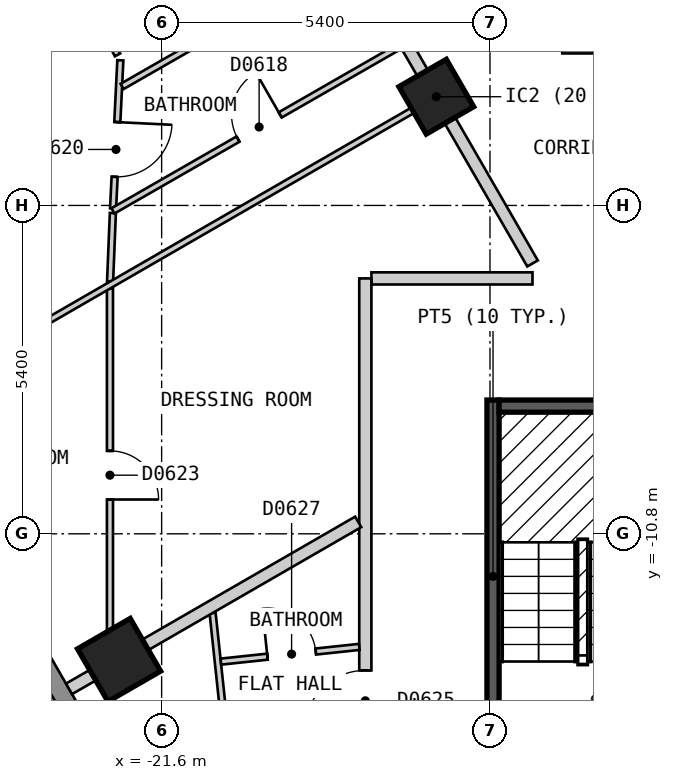
"""IFC4 building model, lengths in metres.
Left out: names, types, materials, properties, quantities, classifications, styles, units other than length and angle.
Written with IfcOpenShell. Run it as: python <this file> out.ifc"""

import sys

from ifc_helpers import new_model, si_unit, direction, frame, frame_2d, origin, origin_2d, place, context, subcontext, project, spatial, polyline, rectangle, outline, extrude, element, fill, save


model = new_model("IFC4")
c1 = context("Model", 3, precision=1e-05, world=origin(), true_north=direction((0.0, 1.0)))
c2 = subcontext(c1, "Body", "Model", "MODEL_VIEW")
j1 = project(units=[si_unit("LENGTHUNIT", "METRE"), si_unit("PLANEANGLEUNIT", "RADIAN")], contexts=[c1])
p1 = place(None, origin())
s1 = spatial("IfcSite", under=j1, at=p1, CompositionType="ELEMENT")
p2 = place(p1, origin())
s2 = spatial("IfcBuilding", under=s1, at=p2, CompositionType="ELEMENT")
p3 = place(p2, frame((0.0, 0.0, 81.0)))
s3 = spatial("IfcBuildingStorey", under=s2, at=p3, CompositionType="ELEMENT", Elevation=81.0)
p4 = place(p3, frame((-22.3, -12.875, 0.0), z_axis=(0.0, 0.0, 1.0), x_axis=(0.5, -0.866025403784, 0.0)))
e1 = element("IfcColumn", 1, at=p4, inside=s3, PredefinedType="COLUMN", context=c2, shape_type="SweptSolid", body=[
    extrude(rectangle(XDim=1.0, YDim=1.0, at=origin_2d()), origin(), (0.0, 0.0, 1.0), 3.0),
])
p5 = place(p3, frame((-17.083, -3.612, 0.0), z_axis=(0.0, 0.0, 1.0), x_axis=(0.5, -0.866025403784, 0.0)))
e2 = element("IfcColumn", 2, at=p5, inside=s3, PredefinedType="COLUMN", context=c2, shape_type="SweptSolid", body=[
    extrude(rectangle(XDim=0.9, YDim=0.9, at=origin_2d()), origin(), (0.0, 0.0, 1.0), 3.0),
])
p6 = place(p3, frame((-29.027, -3.425, 0.0), z_axis=(0.0, 0.0, 1.0), x_axis=(0.500035407905, -0.866004960056, 0.0)))
e3 = element("IfcWall", 3, at=p6, inside=s3, PredefinedType="SOLIDWALL", context=c2, shape_type="SweptSolid", body=[
    extrude(outline(polyline([(0.0, -0.15), (23.094, -0.15), (23.014, 0.15), (0.08, 0.15), (0.0, -0.15)])), origin(), (0.0, 0.0, 1.0), 2.7),
])
p7 = place(p6, frame((1.324, 0.0, 0.15)))
e4 = element("IfcOpeningElement", 4, at=p7, cuts=e3, PredefinedType="OPENING", context=c2, shape_type="SweptSolid", body=[
    extrude(rectangle(XDim=1.5, YDim=2.1, at=frame_2d((0.75, 1.05))), frame((0.0, 0.16, 0.0), z_axis=(0.0, -1.0, 0.0), x_axis=(1.0, 0.0, 0.0)), (0.0, 0.0, 1.0), 0.32),
])
p8 = place(p6, frame((4.031, 0.0, 0.15)))
e5 = element("IfcOpeningElement", 5, at=p8, cuts=e3, PredefinedType="OPENING", context=c2, shape_type="SweptSolid", body=[
    extrude(rectangle(XDim=1.5, YDim=2.1, at=frame_2d((0.75, 1.05))), frame((0.0, 0.16, 0.0), z_axis=(0.0, -1.0, 0.0), x_axis=(1.0, 0.0, 0.0)), (0.0, 0.0, 1.0), 0.32),
])
p9 = place(p6, frame((6.737, 0.0, 0.15)))
e6 = element("IfcOpeningElement", 6, at=p9, cuts=e3, PredefinedType="OPENING", context=c2, shape_type="SweptSolid", body=[
    extrude(rectangle(XDim=1.5, YDim=2.1, at=frame_2d((0.75, 1.05))), frame((0.0, 0.16, 0.0), z_axis=(0.0, -1.0, 0.0), x_axis=(1.0, 0.0, 0.0)), (0.0, 0.0, 1.0), 0.32),
])
p10 = place(p6, frame((9.444, 0.0, 0.15)))
e7 = element("IfcOpeningElement", 7, at=p10, cuts=e3, PredefinedType="OPENING", context=c2, shape_type="SweptSolid", body=[
    extrude(rectangle(XDim=1.5, YDim=2.1, at=frame_2d((0.75, 1.05))), frame((0.0, 0.16, 0.0), z_axis=(0.0, -1.0, 0.0), x_axis=(1.0, 0.0, 0.0)), (0.0, 0.0, 1.0), 0.32),
])
p11 = place(p6, frame((12.151, 0.0, 0.15)))
e8 = element("IfcOpeningElement", 8, at=p11, cuts=e3, PredefinedType="OPENING", context=c2, shape_type="SweptSolid", body=[
    extrude(rectangle(XDim=1.5, YDim=2.1, at=frame_2d((0.75, 1.05))), frame((0.0, 0.16, 0.0), z_axis=(0.0, -1.0, 0.0), x_axis=(1.0, 0.0, 0.0)), (0.0, 0.0, 1.0), 0.32),
])
p12 = place(p6, frame((14.857, 0.0, 0.15)))
e9 = element("IfcOpeningElement", 9, at=p12, cuts=e3, PredefinedType="OPENING", context=c2, shape_type="SweptSolid", body=[
    extrude(rectangle(XDim=1.5, YDim=2.1, at=frame_2d((0.75, 1.05))), frame((0.0, 0.16, 0.0), z_axis=(0.0, -1.0, 0.0), x_axis=(1.0, 0.0, 0.0)), (0.0, 0.0, 1.0), 0.32),
])
p13 = place(p6, frame((17.564, 0.0, 0.15)))
e10 = element("IfcOpeningElement", 10, at=p13, cuts=e3, PredefinedType="OPENING", context=c2, shape_type="SweptSolid", body=[
    extrude(rectangle(XDim=1.5, YDim=2.1, at=frame_2d((0.75, 1.05))), frame((0.0, 0.16, 0.0), z_axis=(0.0, -1.0, 0.0), x_axis=(1.0, 0.0, 0.0)), (0.0, 0.0, 1.0), 0.32),
])
p14 = place(p6, frame((20.27, 0.0, 0.15)))
e11 = element("IfcOpeningElement", 11, at=p14, cuts=e3, PredefinedType="OPENING", context=c2, shape_type="SweptSolid", body=[
    extrude(rectangle(XDim=1.5, YDim=2.1, at=frame_2d((0.75, 1.05))), frame((0.0, 0.16, 0.0), z_axis=(0.0, -1.0, 0.0), x_axis=(1.0, 0.0, 0.0)), (0.0, 0.0, 1.0), 0.32),
])
p15 = place(p3, frame((-18.533, -1.101, 0.0), z_axis=(0.0, 0.0, 1.0), x_axis=(0.500022085096, -0.866012652573, 0.0)))
e12 = element("IfcWall", 12, at=p15, inside=s3, PredefinedType="PARTITIONING", context=c2, shape_type="SweptSolid", body=[
    extrude(rectangle(XDim=6.066, YDim=0.2, at=frame_2d((3.033, 0.0))), origin(), (0.0, 0.0, 1.0), 2.7),
])
p16 = place(p15, frame((0.532, 0.0, 0.0)))
e13 = element("IfcOpeningElement", 13, at=p16, cuts=e12, PredefinedType="OPENING", context=c2, shape_type="SweptSolid", body=[
    extrude(rectangle(XDim=1.0, YDim=2.1, at=frame_2d((0.5, 1.05))), frame((0.0, 0.11, 0.0), z_axis=(0.0, -1.0, 0.0), x_axis=(1.0, 0.0, 0.0)), (0.0, 0.0, 1.0), 0.22),
])
p17 = place(p3, frame((-18.15, -6.6, 0.0), z_axis=(0.0, 0.0, 1.0), x_axis=(1.0, 0.0, 0.0)))
e14 = element("IfcWall", 14, at=p17, inside=s3, PredefinedType="PARTITIONING", context=c2, shape_type="SweptSolid", body=[
    extrude(rectangle(XDim=2.649, YDim=0.2, at=frame_2d((1.324, 0.0))), origin(), (0.0, 0.0, 1.0), 2.7),
])
p18 = place(p3, frame((-15.011, -2.8, 0.0), z_axis=(0.0, 0.0, 1.0), x_axis=(1.0, 0.0, 0.0)))
e15 = element("IfcWall", 15, at=p18, inside=s3, PredefinedType="PARTITIONING", context=c2, shape_type="SweptSolid", body=[
    extrude(rectangle(XDim=7.982, YDim=0.2, at=frame_2d((3.991, 0.0))), origin(), (0.0, 0.0, 1.0), 2.7),
])
p19 = place(p3, frame((-18.25, -14.386, 0.0), z_axis=(0.0, 0.0, 1.0), x_axis=(0.0, 1.0, 0.0)))
e16 = element("IfcWall", 16, at=p19, inside=s3, PredefinedType="PARTITIONING", context=c2, shape_type="SweptSolid", body=[
    extrude(rectangle(XDim=7.786, YDim=0.2, at=frame_2d((3.893, 0.0))), origin(), (0.0, 0.0, 1.0), 2.7),
])
p20 = place(p19, frame((0.34, 0.0, 0.0)))
e17 = element("IfcOpeningElement", 17, at=p20, cuts=e16, PredefinedType="OPENING", context=c2, shape_type="SweptSolid", body=[
    extrude(rectangle(XDim=1.0, YDim=2.1, at=frame_2d((0.5, 1.05))), frame((0.0, 0.11, 0.0), z_axis=(0.0, -1.0, 0.0), x_axis=(1.0, 0.0, 0.0)), (0.0, 0.0, 1.0), 0.22),
])
p21 = place(p3, frame((-23.289, -1.054, 0.0), z_axis=(0.0, 0.0, 1.0), x_axis=(0.458226112305, -0.888835659726, 0.0)))
e18 = element("IfcWall", 18, at=p21, inside=s3, PredefinedType="PARTITIONING", context=c2, shape_type="SweptSolid", body=[
    extrude(rectangle(XDim=2.104, YDim=0.1, at=frame_2d((1.052, 0.0))), origin(), (0.0, 0.0, 1.0), 2.7),
])
p22 = place(p3, frame((-20.762, -12.102, 0.0), z_axis=(0.0, 0.0, 1.0), x_axis=(0.106118300401, -0.994353511745, 0.0)))
e19 = element("IfcWall", 19, at=p22, inside=s3, PredefinedType="PARTITIONING", context=c2, shape_type="SweptSolid", body=[
    extrude(rectangle(XDim=2.535, YDim=0.1, at=frame_2d((1.268, 0.0))), origin(), (0.0, 0.0, 1.0), 2.7),
])
p23 = place(p3, frame((-20.626, -12.902, 0.0), z_axis=(0.0, 0.0, 1.0), x_axis=(0.994385570266, 0.105817473257, 0.0)))
e20 = element("IfcWall", 20, at=p23, inside=s3, PredefinedType="PARTITIONING", context=c2, shape_type="SweptSolid", body=[
    extrude(rectangle(XDim=2.289, YDim=0.1, at=frame_2d((1.145, 0.0))), origin(), (0.0, 0.0, 1.0), 2.7),
])
p24 = place(p23, frame((0.77, 0.0, 0.0)))
e21 = element("IfcOpeningElement", 21, at=p24, cuts=e20, PredefinedType="OPENING", context=c2, shape_type="SweptSolid", body=[
    extrude(rectangle(XDim=0.8, YDim=2.1, at=frame_2d((0.4, 1.05))), frame((0.0, 0.06, 0.0), z_axis=(0.0, -1.0, 0.0), x_axis=(1.0, 0.0, 0.0)), (0.0, 0.0, 1.0), 0.12),
])
p25 = place(p3, frame((-22.399, -5.45, 0.0), z_axis=(0.0, 0.0, 1.0), x_axis=(0.049129140995, 0.998792434646, 0.0)))
e22 = element("IfcWall", 22, at=p25, inside=s3, PredefinedType="PARTITIONING", context=c2, shape_type="SweptSolid", body=[
    extrude(rectangle(XDim=2.44, YDim=0.1, at=frame_2d((1.22, 0.0))), origin(), (0.0, 0.0, 1.0), 2.7),
])
p26 = place(p25, frame((0.522, 0.0, 0.0)))
e23 = element("IfcOpeningElement", 23, at=p26, cuts=e22, PredefinedType="OPENING", context=c2, shape_type="SweptSolid", body=[
    extrude(rectangle(XDim=0.9, YDim=2.1, at=frame_2d((0.45, 1.05))), frame((0.0, 0.06, 0.0), z_axis=(0.0, -1.0, 0.0), x_axis=(1.0, 0.0, 0.0)), (0.0, 0.0, 1.0), 0.12),
])
p27 = place(p3, frame((-22.448, -6.651, 0.0), z_axis=(0.0, 0.0, 1.0), x_axis=(0.040729401597, 0.99917021365, 0.0)))
e24 = element("IfcWall", 24, at=p27, inside=s3, PredefinedType="PARTITIONING", context=c2, shape_type="SweptSolid", body=[
    extrude(rectangle(XDim=1.127, YDim=0.1, at=frame_2d((0.563, 0.0))), origin(), (0.0, 0.0, 1.0), 2.7),
])
p28 = place(p3, frame((-22.45, -12.846, 0.0), z_axis=(0.0, 0.0, 1.0), x_axis=(0.0, 1.0, 0.0)))
e25 = element("IfcWall", 25, at=p28, inside=s3, PredefinedType="PARTITIONING", context=c2, shape_type="SweptSolid", body=[
    extrude(rectangle(XDim=6.078, YDim=0.1, at=frame_2d((3.039, 0.0))), origin(), (0.0, 0.0, 1.0), 2.7),
])
p29 = place(p28, frame((2.61, 0.0, 0.0)))
e26 = element("IfcOpeningElement", 26, at=p29, cuts=e25, PredefinedType="OPENING", context=c2, shape_type="SweptSolid", body=[
    extrude(rectangle(XDim=0.8, YDim=2.1, at=frame_2d((0.4, 1.05))), frame((0.0, 0.06, 0.0), z_axis=(0.0, -1.0, 0.0), x_axis=(1.0, 0.0, 0.0)), (0.0, 0.0, 1.0), 0.12),
])
p30 = place(p3, frame((-25.83, -8.662, 0.0), z_axis=(0.0, 0.0, 1.0), x_axis=(0.866022959057, 0.500004234368, 0.0)))
e27 = element("IfcWall", 27, at=p30, inside=s3, PredefinedType="PARTITIONING", context=c2, shape_type="SweptSolid", body=[
    extrude(rectangle(XDim=10.0, YDim=0.1, at=frame_2d((5.0, 0.0))), origin(), (0.0, 0.0, 1.0), 2.7),
])
p31 = place(p30, frame((1.501, 0.0, 0.0)))
e28 = element("IfcOpeningElement", 28, at=p31, cuts=e27, PredefinedType="OPENING", context=c2, shape_type="SweptSolid", body=[
    extrude(rectangle(XDim=0.9, YDim=2.1, at=frame_2d((0.45, 1.05))), frame((0.0, 0.06, 0.0), z_axis=(0.0, -1.0, 0.0), x_axis=(1.0, 0.0, 0.0)), (0.0, 0.0, 1.0), 0.12),
])
p32 = place(p3, frame((-22.401, -5.49, 0.0), z_axis=(0.0, 0.0, 1.0), x_axis=(0.867314404256, 0.497760709749, 0.0)))
e29 = element("IfcWall", 29, at=p32, inside=s3, PredefinedType="PARTITIONING", context=c2, shape_type="SweptSolid", body=[
    extrude(rectangle(XDim=5.444, YDim=0.1, at=frame_2d((2.722, 0.0))), origin(), (0.0, 0.0, 1.0), 2.7),
])
p33 = place(p32, frame((2.372, 0.0, 0.0)))
e30 = element("IfcOpeningElement", 30, at=p33, cuts=e29, PredefinedType="OPENING", context=c2, shape_type="SweptSolid", body=[
    extrude(rectangle(XDim=0.8, YDim=2.1, at=frame_2d((0.4, 1.05))), frame((0.0, 0.06, 0.0), z_axis=(0.0, -1.0, 0.0), x_axis=(1.0, 0.0, 0.0)), (0.0, 0.0, 1.0), 0.12),
])
p34 = place(p3, frame((-22.25, -3.443, 0.0), z_axis=(0.0, 0.0, 1.0), x_axis=(0.867362741349, 0.497676476156, 0.0)))
e31 = element("IfcWall", 31, at=p34, inside=s3, PredefinedType="PARTITIONING", context=c2, shape_type="SweptSolid", body=[
    extrude(rectangle(XDim=4.29, YDim=0.1, at=frame_2d((2.145, 0.0))), origin(), (0.0, 0.0, 1.0), 2.7),
])
p35 = place(p34, frame((1.715, 0.0, 0.0)))
e32 = element("IfcOpeningElement", 32, at=p35, cuts=e31, PredefinedType="OPENING", context=c2, shape_type="SweptSolid", body=[
    extrude(rectangle(XDim=0.9, YDim=2.1, at=frame_2d((0.45, 1.05))), frame((0.0, 0.06, 0.0), z_axis=(0.0, -1.0, 0.0), x_axis=(1.0, 0.0, 0.0)), (0.0, 0.0, 1.0), 0.12),
])
p36 = place(p3, frame((-23.123, -13.35, 0.0), z_axis=(0.0, 0.0, 1.0), x_axis=(0.866013095437, 0.500021318078, 0.0)))
e33 = element("IfcWall", 33, at=p36, inside=s3, PredefinedType="PARTITIONING", context=c2, shape_type="SweptSolid", body=[
    extrude(rectangle(XDim=5.492, YDim=0.2, at=frame_2d((2.746, 0.0))), origin(), (0.0, 0.0, 1.0), 2.7),
])
p37 = place(p3, frame((-16.15, -14.4, 0.0), z_axis=(0.0, 0.0, 1.0), x_axis=(0.0, 1.0, 0.0)))
e34 = element("IfcWall", 34, at=p37, inside=s3, PredefinedType="SOLIDWALL", context=c2, shape_type="SweptSolid", body=[
    extrude(rectangle(XDim=5.8, YDim=0.2, at=frame_2d((2.9, 0.0))), origin(), (0.0, 0.0, 1.0), 2.7),
])
p38 = place(p3, frame((-16.05, -8.7, 0.0), z_axis=(0.0, 0.0, 1.0), x_axis=(1.0, 0.0, 0.0)))
e35 = element("IfcWall", 35, at=p38, inside=s3, PredefinedType="SOLIDWALL", context=c2, shape_type="SweptSolid", body=[
    extrude(rectangle(XDim=2.75, YDim=0.2, at=frame_2d((1.375, 0.0))), origin(), (0.0, 0.0, 1.0), 2.7),
])
p39 = place(p33, origin())
e36 = element("IfcDoor", 36, at=p39, inside=s3, OperationType="SINGLE_SWING_RIGHT", PredefinedType="DOOR", context=c2, shape_type="SweptSolid", body=[
    extrude(rectangle(XDim=0.8, YDim=2.1, at=frame_2d((0.4, 1.05))), frame((0.0, 0.025, 0.0), z_axis=(0.0, -1.0, 0.0), x_axis=(1.0, 0.0, 0.0)), (0.0, 0.0, 1.0), 0.05),
])
fill(e30, e36)
p40 = place(p26, origin())
e37 = element("IfcDoor", 37, at=p40, inside=s3, OperationType="SINGLE_SWING_RIGHT", PredefinedType="DOOR", context=c2, shape_type="SweptSolid", body=[
    extrude(rectangle(XDim=0.9, YDim=2.1, at=frame_2d((0.45, 1.05))), frame((0.0, 0.025, 0.0), z_axis=(0.0, -1.0, 0.0), x_axis=(1.0, 0.0, 0.0)), (0.0, 0.0, 1.0), 0.05),
])
fill(e23, e37)
p41 = place(p29, origin())
e38 = element("IfcDoor", 38, at=p41, inside=s3, OperationType="SINGLE_SWING_LEFT", PredefinedType="DOOR", context=c2, shape_type="SweptSolid", body=[
    extrude(rectangle(XDim=0.8, YDim=2.1, at=frame_2d((0.4, 1.05))), frame((0.0, 0.025, 0.0), z_axis=(0.0, -1.0, 0.0), x_axis=(1.0, 0.0, 0.0)), (0.0, 0.0, 1.0), 0.05),
])
fill(e26, e38)
p42 = place(p20, origin())
e39 = element("IfcDoor", 39, at=p42, inside=s3, OperationType="SINGLE_SWING_LEFT", PredefinedType="DOOR", context=c2, shape_type="SweptSolid", body=[
    extrude(rectangle(XDim=1.0, YDim=2.1, at=frame_2d((0.5, 1.05))), frame((0.0, 0.025, 0.0), z_axis=(0.0, -1.0, 0.0), x_axis=(1.0, 0.0, 0.0)), (0.0, 0.0, 1.0), 0.05),
])
fill(e17, e39)
p43 = place(p24, origin())
e40 = element("IfcDoor", 40, at=p43, inside=s3, OperationType="SINGLE_SWING_LEFT", PredefinedType="DOOR", context=c2, shape_type="SweptSolid", body=[
    extrude(rectangle(XDim=0.8, YDim=2.1, at=frame_2d((0.4, 1.05))), frame((0.0, 0.025, 0.0), z_axis=(0.0, -1.0, 0.0), x_axis=(1.0, 0.0, 0.0)), (0.0, 0.0, 1.0), 0.05),
])
fill(e21, e40)
save(model, sys.argv[1])
